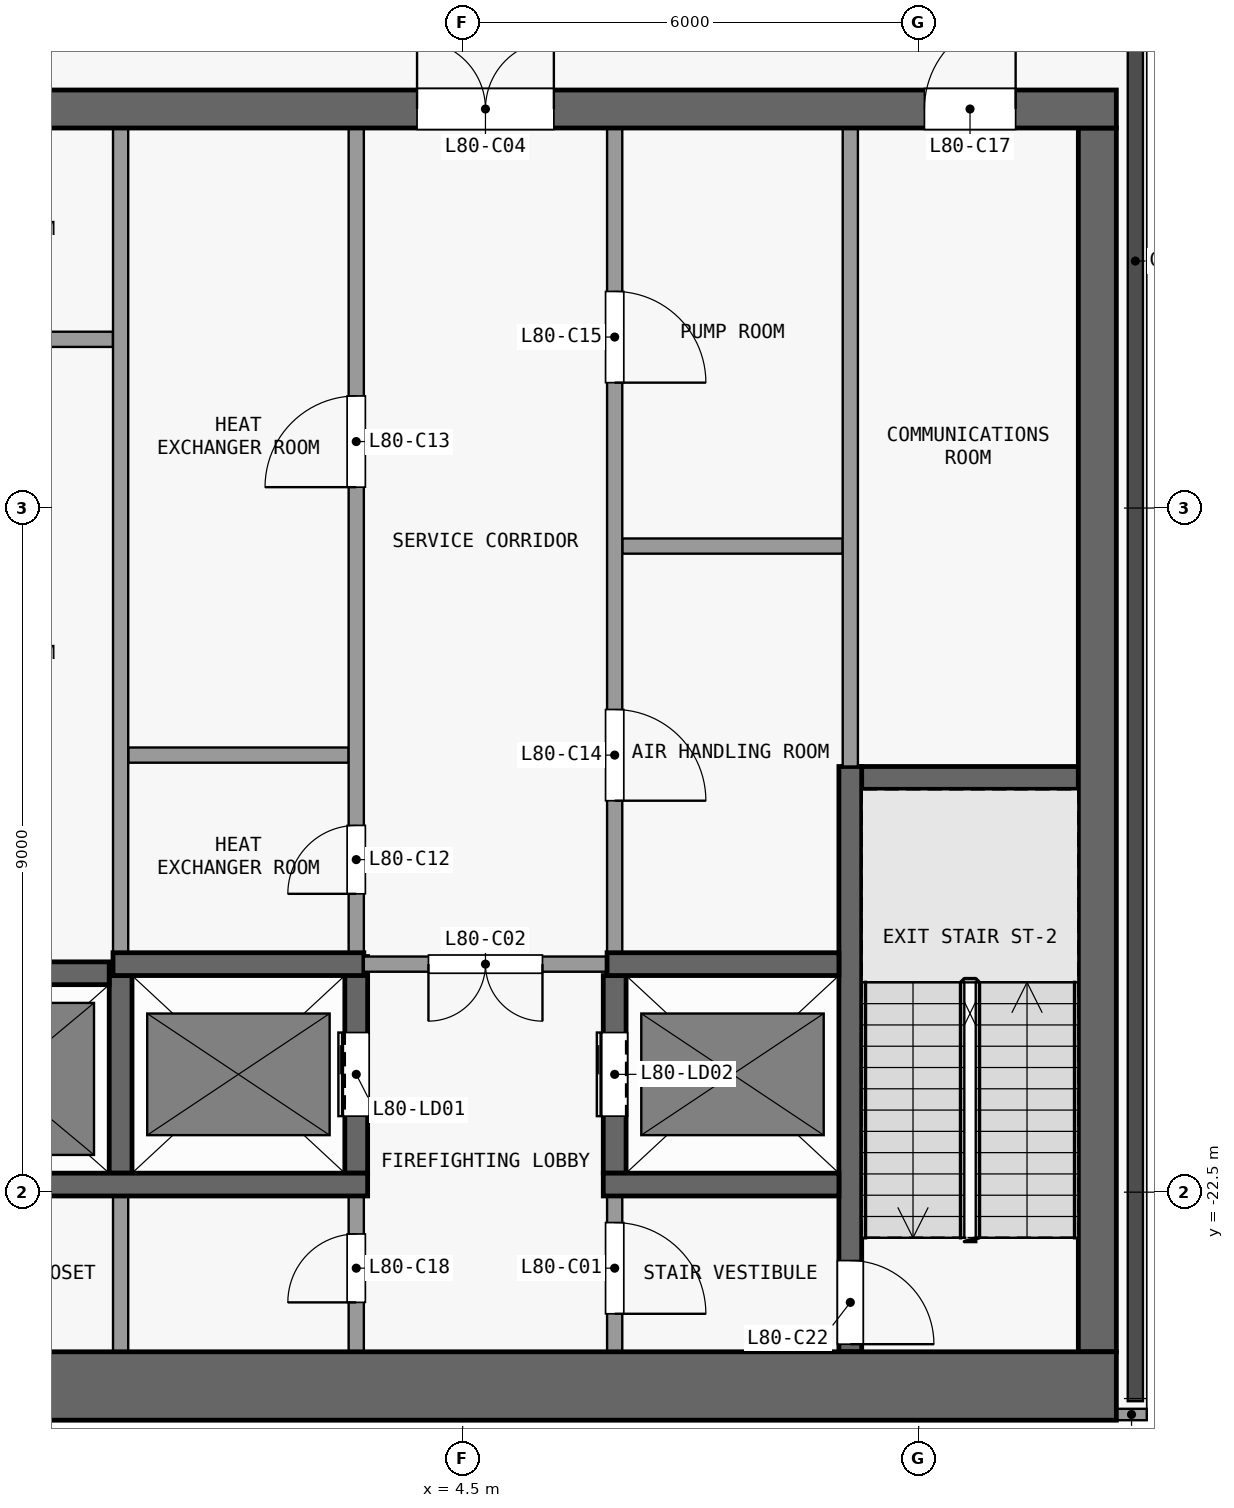
"""IFC4 building model, lengths in metres.
Left out: names, types, materials, properties, quantities, classifications, styles, units other than length and angle.
Written with IfcOpenShell. Run it as: python <this file> out.ifc"""

import sys

from ifc_helpers import new_model, si_unit, direction, frame, frame_2d, origin, place, context, subcontext, project, spatial, rectangle, extrude, element, fill, save


model = new_model("IFC4")
c1 = context("Model", 3, precision=1e-05, world=origin(), true_north=direction((0.0, 1.0)))
c2 = subcontext(c1, "Body", "Model", "MODEL_VIEW")
j1 = project(units=[si_unit("LENGTHUNIT", "METRE"), si_unit("PLANEANGLEUNIT", "RADIAN")], contexts=[c1])
p1 = place(None, origin())
s1 = spatial("IfcSite", under=j1, at=p1, CompositionType="ELEMENT")
p2 = place(p1, origin())
s2 = spatial("IfcBuilding", under=s1, at=p2, CompositionType="ELEMENT")
p3 = place(p2, frame((0.0, 0.0, 316.7)))
s3 = spatial("IfcBuildingStorey", under=s2, at=p3, CompositionType="ELEMENT", Elevation=316.7)
p4 = place(p3, frame((-13.1, -25.05, 0.0), z_axis=(0.0, 0.0, 1.0), x_axis=(1.0, 0.0, 0.0)))
e1 = element("IfcWall", 1, at=p4, inside=s3, PredefinedType="SHEAR", context=c2, shape_type="SweptSolid", body=[
    extrude(rectangle(XDim=26.2, YDim=0.9, at=frame_2d((13.1, 0.0))), origin(), (0.0, 0.0, 1.0), 4.2),
])
p5 = place(p3, frame((-13.1, -8.25, 0.0), z_axis=(0.0, 0.0, 1.0), x_axis=(1.0, 0.0, 0.0)))
e2 = element("IfcWall", 2, at=p5, inside=s3, PredefinedType="SHEAR", context=c2, shape_type="SweptSolid", body=[
    extrude(rectangle(XDim=26.2, YDim=0.5, at=frame_2d((13.1, 0.0))), origin(), (0.0, 0.0, 1.0), 4.2),
])
p6 = place(p5, frame((7.4, 0.0, 0.0)))
e3 = element("IfcOpeningElement", 3, at=p6, cuts=e2, PredefinedType="OPENING", context=c2, shape_type="SweptSolid", body=[
    extrude(rectangle(XDim=1.8, YDim=2.1, at=frame_2d((0.9, 1.05))), frame((0.0, 0.26, 0.0), z_axis=(0.0, -1.0, 0.0), x_axis=(1.0, 0.0, 0.0)), (0.0, 0.0, 1.0), 0.52),
])
p7 = place(p5, frame((17.0, 0.0, 0.0)))
e4 = element("IfcOpeningElement", 4, at=p7, cuts=e2, PredefinedType="OPENING", context=c2, shape_type="SweptSolid", body=[
    extrude(rectangle(XDim=1.8, YDim=2.1, at=frame_2d((0.9, 1.05))), frame((0.0, 0.26, 0.0), z_axis=(0.0, -1.0, 0.0), x_axis=(1.0, 0.0, 0.0)), (0.0, 0.0, 1.0), 0.52),
])
p8 = place(p5, frame((2.325, 0.0, 0.0)))
e5 = element("IfcOpeningElement", 5, at=p8, cuts=e2, PredefinedType="OPENING", context=c2, shape_type="SweptSolid", body=[
    extrude(rectangle(XDim=0.9, YDim=2.1, at=frame_2d((0.45, 1.05))), frame((0.0, 0.26, 0.0), z_axis=(0.0, -1.0, 0.0), x_axis=(1.0, 0.0, 0.0)), (0.0, 0.0, 1.0), 0.52),
])
p9 = place(p5, frame((23.675, 0.0, 0.0)))
e6 = element("IfcOpeningElement", 6, at=p9, cuts=e2, PredefinedType="OPENING", context=c2, shape_type="SweptSolid", body=[
    extrude(rectangle(XDim=1.2, YDim=2.1, at=frame_2d((0.6, 1.05))), frame((0.0, 0.26, 0.0), z_axis=(0.0, -1.0, 0.0), x_axis=(1.0, 0.0, 0.0)), (0.0, 0.0, 1.0), 0.52),
])
p10 = place(p3, frame((12.85, -24.6, 0.0), z_axis=(0.0, 0.0, 1.0), x_axis=(0.0, 1.0, 0.0)))
e7 = element("IfcWall", 7, at=p10, inside=s3, PredefinedType="SHEAR", context=c2, shape_type="SweptSolid", body=[
    extrude(rectangle(XDim=16.1, YDim=0.5, at=frame_2d((8.05, 0.0))), origin(), (0.0, 0.0, 1.0), 4.2),
])
p11 = place(p3, frame((-3.25, -22.4, 0.0), z_axis=(0.0, 0.0, 1.0), x_axis=(1.0, 0.0, 0.0)))
e8 = element("IfcWall", 8, at=p11, inside=s3, PredefinedType="SHEAR", context=c2, shape_type="SweptSolid", body=[
    extrude(rectangle(XDim=6.5, YDim=0.3, at=frame_2d((3.25, 0.0))), origin(), (0.0, 0.0, 1.0), 4.2),
])
p12 = place(p3, frame((6.35, -22.4, 0.0), z_axis=(0.0, 0.0, 1.0), x_axis=(1.0, 0.0, 0.0)))
e9 = element("IfcWall", 9, at=p12, inside=s3, PredefinedType="SHEAR", context=c2, shape_type="SweptSolid", body=[
    extrude(rectangle(XDim=3.1, YDim=0.3, at=frame_2d((1.55, 0.0))), origin(), (0.0, 0.0, 1.0), 4.2),
])
p13 = place(p3, frame((-3.2, -19.62, 0.0), z_axis=(0.0, 0.0, 1.0), x_axis=(1.0, 0.0, 0.0)))
e10 = element("IfcWall", 10, at=p13, inside=s3, PredefinedType="SHEAR", context=c2, shape_type="SweptSolid", body=[
    extrude(rectangle(XDim=3.05, YDim=0.3, at=frame_2d((1.525, 0.0))), origin(), (0.0, 0.0, 1.0), 4.2),
])
p14 = place(p3, frame((-0.1, -19.5, 0.0), z_axis=(0.0, 0.0, 1.0), x_axis=(1.0, 0.0, 0.0)))
e11 = element("IfcWall", 11, at=p14, inside=s3, PredefinedType="SHEAR", context=c2, shape_type="SweptSolid", body=[
    extrude(rectangle(XDim=3.3, YDim=0.3, at=frame_2d((1.65, 0.0))), origin(), (0.0, 0.0, 1.0), 4.2),
])
p15 = place(p3, frame((6.4, -19.5, 0.0), z_axis=(0.0, 0.0, 1.0), x_axis=(-1.0, 0.0, 0.0)))
e12 = element("IfcWall", 12, at=p15, inside=s3, PredefinedType="PARTITIONING", context=c2, shape_type="SweptSolid", body=[
    extrude(rectangle(XDim=3.2, YDim=0.2, at=frame_2d((1.6, 0.0))), origin(), (0.0, 0.0, 1.0), 4.2),
])
p16 = place(p15, frame((0.85, 0.0, 0.0)))
e13 = element("IfcOpeningElement", 13, at=p16, cuts=e12, PredefinedType="OPENING", context=c2, shape_type="SweptSolid", body=[
    extrude(rectangle(XDim=1.5, YDim=2.1, at=frame_2d((0.75, 1.05))), frame((0.0, 0.11, 0.0), z_axis=(0.0, -1.0, 0.0), x_axis=(1.0, 0.0, 0.0)), (0.0, 0.0, 1.0), 0.22),
])
p17 = place(p3, frame((6.4, -19.5, 0.0), z_axis=(0.0, 0.0, 1.0), x_axis=(1.0, 0.0, 0.0)))
e14 = element("IfcWall", 14, at=p17, inside=s3, PredefinedType="SHEAR", context=c2, shape_type="SweptSolid", body=[
    extrude(rectangle(XDim=3.05, YDim=0.3, at=frame_2d((1.525, 0.0))), origin(), (0.0, 0.0, 1.0), 4.2),
])
p18 = place(p3, frame((9.5, -17.05, 0.0), z_axis=(0.0, 0.0, 1.0), x_axis=(1.0, 0.0, 0.0)))
e15 = element("IfcWall", 15, at=p18, inside=s3, PredefinedType="SHEAR", context=c2, shape_type="SweptSolid", body=[
    extrude(rectangle(XDim=3.1, YDim=0.3, at=frame_2d((1.55, 0.0))), origin(), (0.0, 0.0, 1.0), 4.2),
])
for number, where, z_axis, x_axis in (
    (16, (0.1, -16.75, 0.0), (0.0, 0.0, 1.0), (1.0, 0.0, 0.0)),
    (17, (6.6, -14.0, 0.0), (0.0, 0.0, 1.0), (1.0, 0.0, 0.0)),
    (18, (-3.0, -11.28, 0.0), (0.0, 0.0, 1.0), (1.0, 0.0, 0.0)),
):
    element("IfcWall", number, at=place(p3, frame(where, z_axis=z_axis, x_axis=x_axis)), inside=s3, PredefinedType="PARTITIONING", context=c2, shape_type="SweptSolid", body=[
        extrude(rectangle(XDim=2.9, YDim=0.2, at=frame_2d((1.45, 0.0))), origin(), (0.0, 0.0, 1.0), 4.2),
    ])
p19 = place(p3, frame((0.0, -24.6, 0.0), z_axis=(0.0, 0.0, 1.0), x_axis=(0.0, 1.0, 0.0)))
e19 = element("IfcWall", 19, at=p19, inside=s3, PredefinedType="PARTITIONING", context=c2, shape_type="SweptSolid", body=[
    extrude(rectangle(XDim=2.05, YDim=0.2, at=frame_2d((1.025, 0.0))), origin(), (0.0, 0.0, 1.0), 4.2),
])
p20 = place(p3, frame((0.0, -22.25, 0.0), z_axis=(0.0, 0.0, 1.0), x_axis=(0.0, 1.0, 0.0)))
e20 = element("IfcWall", 20, at=p20, inside=s3, PredefinedType="SHEAR", context=c2, shape_type="SweptSolid", body=[
    extrude(rectangle(XDim=2.6, YDim=0.3, at=frame_2d((1.3, 0.0))), origin(), (0.0, 0.0, 1.0), 4.2),
])
p21 = place(p3, frame((0.0, -19.35, 0.0), z_axis=(0.0, 0.0, 1.0), x_axis=(0.0, 1.0, 0.0)))
e21 = element("IfcWall", 21, at=p21, inside=s3, PredefinedType="PARTITIONING", context=c2, shape_type="SweptSolid", body=[
    extrude(rectangle(XDim=10.85, YDim=0.2, at=frame_2d((5.425, 0.0))), origin(), (0.0, 0.0, 1.0), 4.2),
])
p22 = place(p3, frame((3.1, -24.6, 0.0), z_axis=(0.0, 0.0, 1.0), x_axis=(0.0, 1.0, 0.0)))
e22 = element("IfcWall", 22, at=p22, inside=s3, PredefinedType="PARTITIONING", context=c2, shape_type="SweptSolid", body=[
    extrude(rectangle(XDim=2.05, YDim=0.2, at=frame_2d((1.025, 0.0))), origin(), (0.0, 0.0, 1.0), 4.2),
])
p23 = place(p22, frame((0.65, 0.0, 0.0)))
e23 = element("IfcOpeningElement", 23, at=p23, cuts=e22, PredefinedType="OPENING", context=c2, shape_type="SweptSolid", body=[
    extrude(rectangle(XDim=0.9, YDim=2.1, at=frame_2d((0.45, 1.05))), frame((0.0, 0.11, 0.0), z_axis=(0.0, -1.0, 0.0), x_axis=(1.0, 0.0, 0.0)), (0.0, 0.0, 1.0), 0.22),
])
p24 = place(p3, frame((3.1, -22.25, 0.0), z_axis=(0.0, 0.0, 1.0), x_axis=(0.0, 1.0, 0.0)))
e24 = element("IfcWall", 24, at=p24, inside=s3, PredefinedType="SHEAR", context=c2, shape_type="SweptSolid", body=[
    extrude(rectangle(XDim=2.85, YDim=0.3, at=frame_2d((1.425, 0.0))), origin(), (0.0, 0.0, 1.0), 4.2),
])
p25 = place(p24, frame((0.75, 0.0, 0.0)))
e25 = element("IfcOpeningElement", 25, at=p25, cuts=e24, PredefinedType="OPENING", context=c2, shape_type="SweptSolid", body=[
    extrude(rectangle(XDim=1.1, YDim=2.1, at=frame_2d((0.55, 1.05))), frame((0.0, 0.16, 0.0), z_axis=(0.0, -1.0, 0.0), x_axis=(1.0, 0.0, 0.0)), (0.0, 0.0, 1.0), 0.32),
])
p26 = place(p3, frame((3.1, -19.6, 0.0), z_axis=(0.0, 0.0, 1.0), x_axis=(0.0, 1.0, 0.0)))
e26 = element("IfcWall", 26, at=p26, inside=s3, PredefinedType="PARTITIONING", context=c2, shape_type="SweptSolid", body=[
    extrude(rectangle(XDim=11.1, YDim=0.2, at=frame_2d((5.55, 0.0))), origin(), (0.0, 0.0, 1.0), 4.2),
])
p27 = place(p26, frame((1.025, 0.0, 0.0)))
e27 = element("IfcOpeningElement", 27, at=p27, cuts=e26, PredefinedType="OPENING", context=c2, shape_type="SweptSolid", body=[
    extrude(rectangle(XDim=0.9, YDim=2.1, at=frame_2d((0.45, 1.05))), frame((0.0, 0.11, 0.0), z_axis=(0.0, -1.0, 0.0), x_axis=(1.0, 0.0, 0.0)), (0.0, 0.0, 1.0), 0.22),
])
p28 = place(p26, frame((6.375, 0.0, 0.0)))
e28 = element("IfcOpeningElement", 28, at=p28, cuts=e26, PredefinedType="OPENING", context=c2, shape_type="SweptSolid", body=[
    extrude(rectangle(XDim=1.2, YDim=2.1, at=frame_2d((0.6, 1.05))), frame((0.0, 0.11, 0.0), z_axis=(0.0, -1.0, 0.0), x_axis=(1.0, 0.0, 0.0)), (0.0, 0.0, 1.0), 0.22),
])
p29 = place(p3, frame((6.5, -22.55, 0.0), z_axis=(0.0, 0.0, 1.0), x_axis=(0.0, -1.0, 0.0)))
e29 = element("IfcWall", 29, at=p29, inside=s3, PredefinedType="PARTITIONING", context=c2, shape_type="SweptSolid", body=[
    extrude(rectangle(XDim=2.05, YDim=0.2, at=frame_2d((1.025, 0.0))), origin(), (0.0, 0.0, 1.0), 4.2),
])
p30 = place(p29, frame((0.35, 0.0, 0.0)))
e30 = element("IfcOpeningElement", 30, at=p30, cuts=e29, PredefinedType="OPENING", context=c2, shape_type="SweptSolid", body=[
    extrude(rectangle(XDim=1.2, YDim=2.1, at=frame_2d((0.6, 1.05))), frame((0.0, 0.11, 0.0), z_axis=(0.0, -1.0, 0.0), x_axis=(1.0, 0.0, 0.0)), (0.0, 0.0, 1.0), 0.22),
])
p31 = place(p3, frame((6.5, -22.25, 0.0), z_axis=(0.0, 0.0, 1.0), x_axis=(0.0, 1.0, 0.0)))
e31 = element("IfcWall", 31, at=p31, inside=s3, PredefinedType="SHEAR", context=c2, shape_type="SweptSolid", body=[
    extrude(rectangle(XDim=2.6, YDim=0.3, at=frame_2d((1.3, 0.0))), origin(), (0.0, 0.0, 1.0), 4.2),
])
p32 = place(p31, frame((0.75, 0.0, 0.0)))
e32 = element("IfcOpeningElement", 32, at=p32, cuts=e31, PredefinedType="OPENING", context=c2, shape_type="SweptSolid", body=[
    extrude(rectangle(XDim=1.1, YDim=2.1, at=frame_2d((0.55, 1.05))), frame((0.0, 0.16, 0.0), z_axis=(0.0, -1.0, 0.0), x_axis=(1.0, 0.0, 0.0)), (0.0, 0.0, 1.0), 0.32),
])
p33 = place(p3, frame((6.5, -8.5, 0.0), z_axis=(0.0, 0.0, 1.0), x_axis=(0.0, -1.0, 0.0)))
e33 = element("IfcWall", 33, at=p33, inside=s3, PredefinedType="PARTITIONING", context=c2, shape_type="SweptSolid", body=[
    extrude(rectangle(XDim=10.85, YDim=0.2, at=frame_2d((5.425, 0.0))), origin(), (0.0, 0.0, 1.0), 4.2),
])
p34 = place(p33, frame((7.65, 0.0, 0.0)))
e34 = element("IfcOpeningElement", 34, at=p34, cuts=e33, PredefinedType="OPENING", context=c2, shape_type="SweptSolid", body=[
    extrude(rectangle(XDim=1.2, YDim=2.1, at=frame_2d((0.6, 1.05))), frame((0.0, 0.11, 0.0), z_axis=(0.0, -1.0, 0.0), x_axis=(1.0, 0.0, 0.0)), (0.0, 0.0, 1.0), 0.22),
])
p35 = place(p33, frame((2.15, 0.0, 0.0)))
e35 = element("IfcOpeningElement", 35, at=p35, cuts=e33, PredefinedType="OPENING", context=c2, shape_type="SweptSolid", body=[
    extrude(rectangle(XDim=1.2, YDim=2.1, at=frame_2d((0.6, 1.05))), frame((0.0, 0.11, 0.0), z_axis=(0.0, -1.0, 0.0), x_axis=(1.0, 0.0, 0.0)), (0.0, 0.0, 1.0), 0.22),
])
p36 = place(p3, frame((9.6, -16.9, 0.0), z_axis=(0.0, 0.0, 1.0), x_axis=(0.0, -1.0, 0.0)))
e36 = element("IfcWall", 36, at=p36, inside=s3, PredefinedType="SHEAR", context=c2, shape_type="SweptSolid", body=[
    extrude(rectangle(XDim=7.7, YDim=0.3, at=frame_2d((3.85, 0.0))), origin(), (0.0, 0.0, 1.0), 4.2),
])
p37 = place(p36, frame((6.5, 0.0, 0.0)))
e37 = element("IfcOpeningElement", 37, at=p37, cuts=e36, PredefinedType="OPENING", context=c2, shape_type="SweptSolid", body=[
    extrude(rectangle(XDim=1.1, YDim=2.1, at=frame_2d((0.55, 1.05))), frame((0.0, 0.16, 0.0), z_axis=(0.0, -1.0, 0.0), x_axis=(1.0, 0.0, 0.0)), (0.0, 0.0, 1.0), 0.32),
])
p38 = place(p3, frame((9.6, -16.9, 0.0), z_axis=(0.0, 0.0, 1.0), x_axis=(0.0, 1.0, 0.0)))
e38 = element("IfcWall", 38, at=p38, inside=s3, PredefinedType="PARTITIONING", context=c2, shape_type="SweptSolid", body=[
    extrude(rectangle(XDim=8.4, YDim=0.2, at=frame_2d((4.2, 0.0))), origin(), (0.0, 0.0, 1.0), 4.2),
])
p39 = place(p3, frame((13.5, -25.425, 0.0), z_axis=(0.0, 0.0, 1.0), x_axis=(-1.0, 0.0, 0.0)))
e39 = element("IfcWall", 39, at=p39, inside=s3, PredefinedType="SOLIDWALL", context=c2, shape_type="SweptSolid", body=[
    extrude(rectangle(XDim=0.4, YDim=0.15, at=frame_2d((0.2, 0.0))), origin(), (0.0, 0.0, 1.0), 4.2),
])
p40 = place(p25, origin())
e40 = element("IfcDoor", 40, at=p40, inside=s3, OperationType="DOUBLE_DOOR_SLIDING", PredefinedType="DOOR", context=c2, shape_type="SweptSolid", body=[
    extrude(rectangle(XDim=1.1, YDim=2.1, at=frame_2d((0.55, 1.05))), frame((0.0, 0.025, 0.0), z_axis=(0.0, -1.0, 0.0), x_axis=(1.0, 0.0, 0.0)), (0.0, 0.0, 1.0), 0.05),
])
fill(e25, e40)
p41 = place(p32, origin())
e41 = element("IfcDoor", 41, at=p41, inside=s3, OperationType="DOUBLE_DOOR_SLIDING", PredefinedType="DOOR", context=c2, shape_type="SweptSolid", body=[
    extrude(rectangle(XDim=1.1, YDim=2.1, at=frame_2d((0.55, 1.05))), frame((0.0, 0.025, 0.0), z_axis=(0.0, -1.0, 0.0), x_axis=(1.0, 0.0, 0.0)), (0.0, 0.0, 1.0), 0.05),
])
fill(e32, e41)
p42 = place(p30, origin())
e42 = element("IfcDoor", 42, at=p42, inside=s3, OperationType="SINGLE_SWING_RIGHT", PredefinedType="DOOR", context=c2, shape_type="SweptSolid", body=[
    extrude(rectangle(XDim=1.2, YDim=2.1, at=frame_2d((0.6, 1.05))), frame((0.0, 0.025, 0.0), z_axis=(0.0, -1.0, 0.0), x_axis=(1.0, 0.0, 0.0)), (0.0, 0.0, 1.0), 0.05),
])
fill(e30, e42)
p43 = place(p16, origin())
e43 = element("IfcDoor", 43, at=p43, inside=s3, OperationType="DOUBLE_DOOR_SINGLE_SWING", PredefinedType="DOOR", context=c2, shape_type="SweptSolid", body=[
    extrude(rectangle(XDim=1.5, YDim=2.1, at=frame_2d((0.75, 1.05))), frame((0.0, 0.025, 0.0), z_axis=(0.0, -1.0, 0.0), x_axis=(1.0, 0.0, 0.0)), (0.0, 0.0, 1.0), 0.05),
])
fill(e13, e43)
p44 = place(p7, origin())
e44 = element("IfcDoor", 44, at=p44, inside=s3, OperationType="DOUBLE_DOOR_SINGLE_SWING", PredefinedType="DOOR", context=c2, shape_type="SweptSolid", body=[
    extrude(rectangle(XDim=1.8, YDim=2.1, at=frame_2d((0.9, 1.05))), frame((0.0, 0.025, 0.0), z_axis=(0.0, -1.0, 0.0), x_axis=(1.0, 0.0, 0.0)), (0.0, 0.0, 1.0), 0.05),
])
fill(e4, e44)
p45 = place(p27, origin())
e45 = element("IfcDoor", 45, at=p45, inside=s3, OperationType="SINGLE_SWING_LEFT", PredefinedType="DOOR", context=c2, shape_type="SweptSolid", body=[
    extrude(rectangle(XDim=0.9, YDim=2.1, at=frame_2d((0.45, 1.05))), frame((0.0, 0.025, 0.0), z_axis=(0.0, -1.0, 0.0), x_axis=(1.0, 0.0, 0.0)), (0.0, 0.0, 1.0), 0.05),
])
fill(e27, e45)
p46 = place(p28, origin())
e46 = element("IfcDoor", 46, at=p46, inside=s3, OperationType="SINGLE_SWING_LEFT", PredefinedType="DOOR", context=c2, shape_type="SweptSolid", body=[
    extrude(rectangle(XDim=1.2, YDim=2.1, at=frame_2d((0.6, 1.05))), frame((0.0, 0.025, 0.0), z_axis=(0.0, -1.0, 0.0), x_axis=(1.0, 0.0, 0.0)), (0.0, 0.0, 1.0), 0.05),
])
fill(e28, e46)
p47 = place(p34, origin())
e47 = element("IfcDoor", 47, at=p47, inside=s3, OperationType="SINGLE_SWING_RIGHT", PredefinedType="DOOR", context=c2, shape_type="SweptSolid", body=[
    extrude(rectangle(XDim=1.2, YDim=2.1, at=frame_2d((0.6, 1.05))), frame((0.0, 0.025, 0.0), z_axis=(0.0, -1.0, 0.0), x_axis=(1.0, 0.0, 0.0)), (0.0, 0.0, 1.0), 0.05),
])
fill(e34, e47)
p48 = place(p35, origin())
e48 = element("IfcDoor", 48, at=p48, inside=s3, OperationType="SINGLE_SWING_RIGHT", PredefinedType="DOOR", context=c2, shape_type="SweptSolid", body=[
    extrude(rectangle(XDim=1.2, YDim=2.1, at=frame_2d((0.6, 1.05))), frame((0.0, 0.025, 0.0), z_axis=(0.0, -1.0, 0.0), x_axis=(1.0, 0.0, 0.0)), (0.0, 0.0, 1.0), 0.05),
])
fill(e35, e48)
p49 = place(p9, origin())
e49 = element("IfcDoor", 49, at=p49, inside=s3, OperationType="SINGLE_SWING_RIGHT", PredefinedType="DOOR", context=c2, shape_type="SweptSolid", body=[
    extrude(rectangle(XDim=1.2, YDim=2.1, at=frame_2d((0.6, 1.05))), frame((0.0, 0.025, 0.0), z_axis=(0.0, -1.0, 0.0), x_axis=(1.0, 0.0, 0.0)), (0.0, 0.0, 1.0), 0.05),
])
fill(e6, e49)
p50 = place(p23, origin())
e50 = element("IfcDoor", 50, at=p50, inside=s3, OperationType="SINGLE_SWING_LEFT", PredefinedType="DOOR", context=c2, shape_type="SweptSolid", body=[
    extrude(rectangle(XDim=0.9, YDim=2.1, at=frame_2d((0.45, 1.05))), frame((0.0, 0.025, 0.0), z_axis=(0.0, -1.0, 0.0), x_axis=(1.0, 0.0, 0.0)), (0.0, 0.0, 1.0), 0.05),
])
fill(e23, e50)
p51 = place(p37, origin())
e51 = element("IfcDoor", 51, at=p51, inside=s3, OperationType="SINGLE_SWING_RIGHT", PredefinedType="DOOR", context=c2, shape_type="SweptSolid", body=[
    extrude(rectangle(XDim=1.1, YDim=2.1, at=frame_2d((0.55, 1.05))), frame((0.0, 0.025, 0.0), z_axis=(0.0, -1.0, 0.0), x_axis=(1.0, 0.0, 0.0)), (0.0, 0.0, 1.0), 0.05),
])
fill(e37, e51)
save(model, sys.argv[1])
